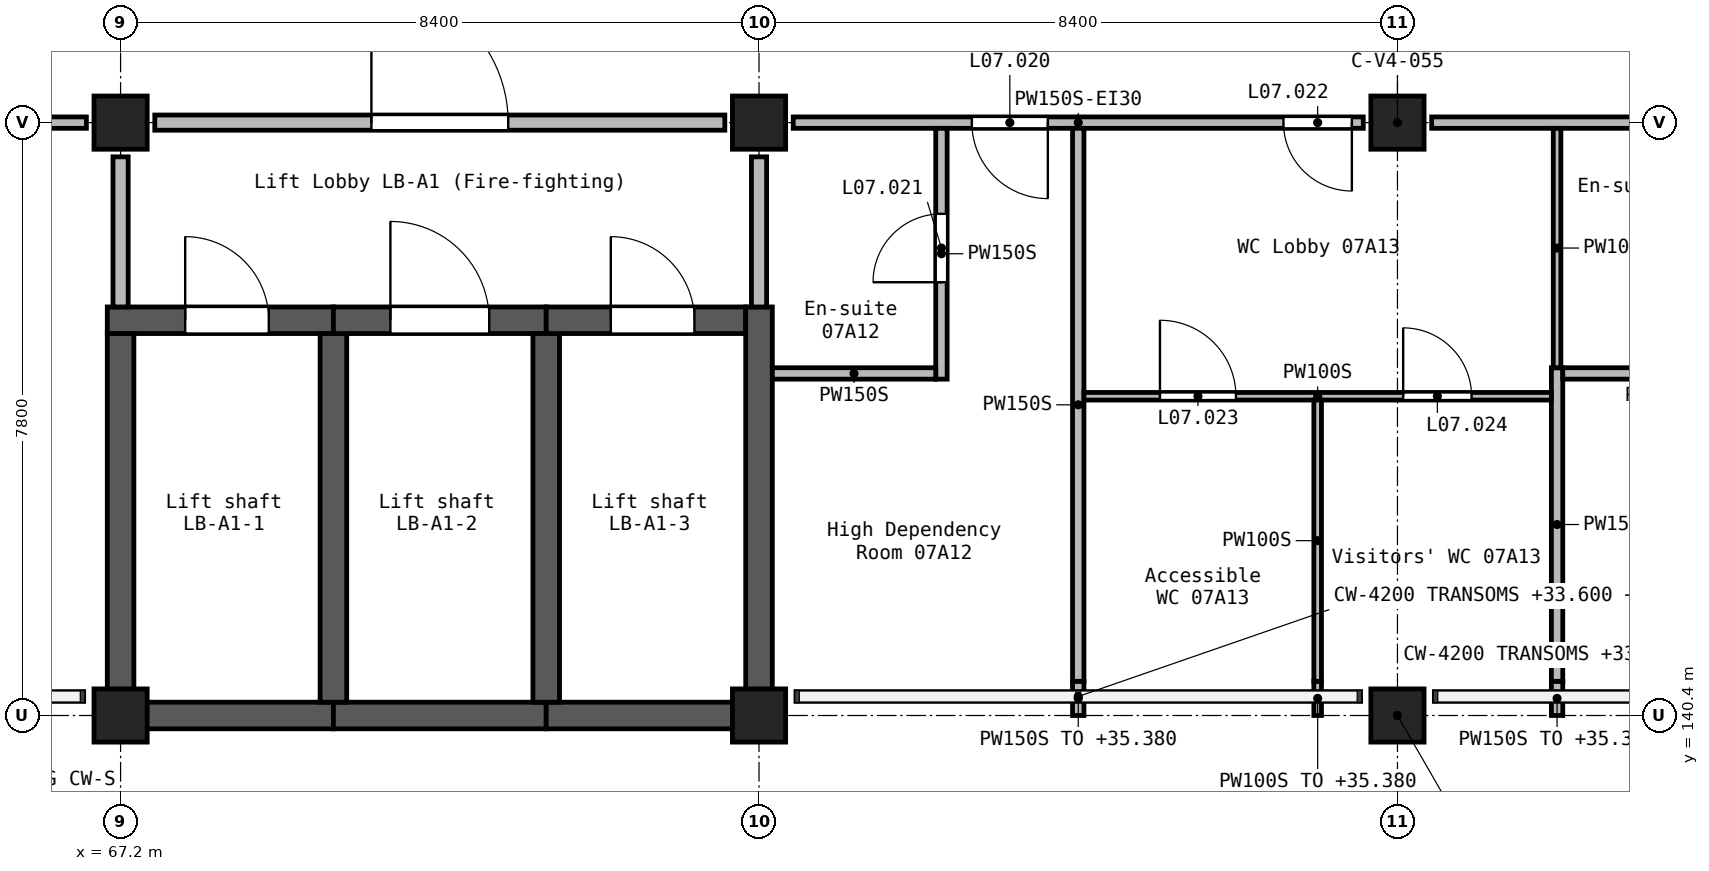
"""IFC4 building model, lengths in metres.
Left out: names, types, materials, properties, quantities, classifications, styles, units other than length and angle.
Written with IfcOpenShell. Run it as: python <this file> out.ifc"""

import sys

from ifc_helpers import new_model, si_unit, direction, frame, frame_2d, origin, origin_2d, place, context, subcontext, project, spatial, rectangle, extrude, element, fill, save


model = new_model("IFC4")
c1 = context("Model", 3, precision=1e-05, world=origin(), true_north=direction((0.0, 1.0)))
c2 = subcontext(c1, "Body", "Model", "MODEL_VIEW")
j1 = project(units=[si_unit("LENGTHUNIT", "METRE"), si_unit("PLANEANGLEUNIT", "RADIAN")], contexts=[c1])
p1 = place(None, origin())
s1 = spatial("IfcSite", under=j1, at=p1, CompositionType="ELEMENT")
p2 = place(p1, origin())
s2 = spatial("IfcBuilding", under=s1, at=p2, CompositionType="ELEMENT")
p3 = place(p2, frame((0.0, 0.0, 32.7)))
s3 = spatial("IfcBuildingStorey", under=s2, at=p3, CompositionType="ELEMENT", Elevation=32.7)
for number, where, z_axis, x_axis in (
    (1, (67.2, 140.4, 0.0), (0.0, 0.0, 1.0), (1.0, 0.0, 0.0)),
    (2, (67.2, 148.2, 0.0), (0.0, 0.0, 1.0), (1.0, 0.0, 0.0)),
    (3, (75.6, 140.4, 0.0), (0.0, 0.0, 1.0), (1.0, 0.0, 0.0)),
    (4, (75.6, 148.2, 0.0), (0.0, 0.0, 1.0), (1.0, 0.0, 0.0)),
    (5, (84.0, 140.4, 0.0), (0.0, 0.0, 1.0), (1.0, 0.0, 0.0)),
    (6, (84.0, 148.2, 0.0), (0.0, 0.0, 1.0), (1.0, 0.0, 0.0)),
):
    element("IfcColumn", number, at=place(p3, frame(where, z_axis=z_axis, x_axis=x_axis)), inside=s3, PredefinedType="COLUMN", context=c2, shape_type="SweptSolid", body=[
        extrude(rectangle(XDim=0.7, YDim=0.7, at=origin_2d()), origin(), (0.0, 0.0, 1.0), 3.9),
    ])
p4 = place(p3, frame((67.025, 145.6, 0.0), z_axis=(0.0, 0.0, 1.0), x_axis=(1.0, 0.0, 0.0)))
e7 = element("IfcWall", 7, at=p4, inside=s3, PredefinedType="SHEAR", context=c2, shape_type="SweptSolid", body=[
    extrude(rectangle(XDim=2.975, YDim=0.35, at=frame_2d((1.488, 0.0))), origin(), (0.0, 0.0, 1.0), 3.9),
])
p5 = place(p4, frame((1.025, 0.0, 0.0)))
e8 = element("IfcOpeningElement", 8, at=p5, cuts=e7, PredefinedType="OPENING", context=c2, shape_type="SweptSolid", body=[
    extrude(rectangle(XDim=1.1, YDim=2.1, at=frame_2d((0.55, 1.05))), frame((0.0, 0.185, 0.0), z_axis=(0.0, -1.0, 0.0), x_axis=(1.0, 0.0, 0.0)), (0.0, 0.0, 1.0), 0.37),
])
p6 = place(p3, frame((67.2, 140.225, 0.0), z_axis=(0.0, 0.0, 1.0), x_axis=(0.0, 1.0, 0.0)))
e9 = element("IfcWall", 9, at=p6, inside=s3, PredefinedType="SHEAR", context=c2, shape_type="SweptSolid", body=[
    extrude(rectangle(XDim=5.2, YDim=0.35, at=frame_2d((2.6, 0.0))), origin(), (0.0, 0.0, 1.0), 3.9),
])
p7 = place(p3, frame((67.375, 140.4, 0.0), z_axis=(0.0, 0.0, 1.0), x_axis=(1.0, 0.0, 0.0)))
e10 = element("IfcWall", 10, at=p7, inside=s3, PredefinedType="SHEAR", context=c2, shape_type="SweptSolid", body=[
    extrude(rectangle(XDim=2.625, YDim=0.35, at=frame_2d((1.312, 0.0))), origin(), (0.0, 0.0, 1.0), 3.9),
])
p8 = place(p3, frame((70.0, 140.4, 0.0), z_axis=(0.0, 0.0, 1.0), x_axis=(1.0, 0.0, 0.0)))
e11 = element("IfcWall", 11, at=p8, inside=s3, PredefinedType="SHEAR", context=c2, shape_type="SweptSolid", body=[
    extrude(rectangle(XDim=2.8, YDim=0.35, at=frame_2d((1.4, 0.0))), origin(), (0.0, 0.0, 1.0), 3.9),
])
p9 = place(p3, frame((70.0, 140.575, 0.0), z_axis=(0.0, 0.0, 1.0), x_axis=(0.0, 1.0, 0.0)))
e12 = element("IfcWall", 12, at=p9, inside=s3, PredefinedType="SHEAR", context=c2, shape_type="SweptSolid", body=[
    extrude(rectangle(XDim=4.85, YDim=0.35, at=frame_2d((2.425, 0.0))), origin(), (0.0, 0.0, 1.0), 3.9),
])
p10 = place(p3, frame((70.0, 145.6, 0.0), z_axis=(0.0, 0.0, 1.0), x_axis=(1.0, 0.0, 0.0)))
e13 = element("IfcWall", 13, at=p10, inside=s3, PredefinedType="SHEAR", context=c2, shape_type="SweptSolid", body=[
    extrude(rectangle(XDim=2.8, YDim=0.35, at=frame_2d((1.4, 0.0))), origin(), (0.0, 0.0, 1.0), 3.9),
])
p11 = place(p10, frame((0.75, 0.0, 0.0)))
e14 = element("IfcOpeningElement", 14, at=p11, cuts=e13, PredefinedType="OPENING", context=c2, shape_type="SweptSolid", body=[
    extrude(rectangle(XDim=1.3, YDim=2.1, at=frame_2d((0.65, 1.05))), frame((0.0, 0.185, 0.0), z_axis=(0.0, -1.0, 0.0), x_axis=(1.0, 0.0, 0.0)), (0.0, 0.0, 1.0), 0.37),
])
p12 = place(p3, frame((72.8, 140.4, 0.0), z_axis=(0.0, 0.0, 1.0), x_axis=(1.0, 0.0, 0.0)))
e15 = element("IfcWall", 15, at=p12, inside=s3, PredefinedType="SHEAR", context=c2, shape_type="SweptSolid", body=[
    extrude(rectangle(XDim=2.625, YDim=0.35, at=frame_2d((1.312, 0.0))), origin(), (0.0, 0.0, 1.0), 3.9),
])
p13 = place(p3, frame((72.8, 140.575, 0.0), z_axis=(0.0, 0.0, 1.0), x_axis=(0.0, 1.0, 0.0)))
e16 = element("IfcWall", 16, at=p13, inside=s3, PredefinedType="SHEAR", context=c2, shape_type="SweptSolid", body=[
    extrude(rectangle(XDim=4.85, YDim=0.35, at=frame_2d((2.425, 0.0))), origin(), (0.0, 0.0, 1.0), 3.9),
])
p14 = place(p3, frame((72.8, 145.6, 0.0), z_axis=(0.0, 0.0, 1.0), x_axis=(1.0, 0.0, 0.0)))
e17 = element("IfcWall", 17, at=p14, inside=s3, PredefinedType="SHEAR", context=c2, shape_type="SweptSolid", body=[
    extrude(rectangle(XDim=2.625, YDim=0.35, at=frame_2d((1.312, 0.0))), origin(), (0.0, 0.0, 1.0), 3.9),
])
p15 = place(p14, frame((0.85, 0.0, 0.0)))
e18 = element("IfcOpeningElement", 18, at=p15, cuts=e17, PredefinedType="OPENING", context=c2, shape_type="SweptSolid", body=[
    extrude(rectangle(XDim=1.1, YDim=2.1, at=frame_2d((0.55, 1.05))), frame((0.0, 0.185, 0.0), z_axis=(0.0, -1.0, 0.0), x_axis=(1.0, 0.0, 0.0)), (0.0, 0.0, 1.0), 0.37),
])
p16 = place(p3, frame((75.6, 140.225, 0.0), z_axis=(0.0, 0.0, 1.0), x_axis=(0.0, 1.0, 0.0)))
e19 = element("IfcWall", 19, at=p16, inside=s3, PredefinedType="SHEAR", context=c2, shape_type="SweptSolid", body=[
    extrude(rectangle(XDim=5.55, YDim=0.35, at=frame_2d((2.775, 0.0))), origin(), (0.0, 0.0, 1.0), 3.9),
])
p17 = place(p3, frame((67.65, 148.2, 0.0), z_axis=(0.0, 0.0, 1.0), x_axis=(1.0, 0.0, 0.0)))
e20 = element("IfcWall", 20, at=p17, inside=s3, PredefinedType="SOLIDWALL", context=c2, shape_type="SweptSolid", body=[
    extrude(rectangle(XDim=7.5, YDim=0.2, at=frame_2d((3.75, 0.0))), origin(), (0.0, 0.0, 1.0), 3.6),
])
p18 = place(p17, frame((2.85, 0.0, 0.0)))
e21 = element("IfcOpeningElement", 21, at=p18, cuts=e20, PredefinedType="OPENING", context=c2, shape_type="SweptSolid", body=[
    extrude(rectangle(XDim=1.8, YDim=2.1, at=frame_2d((0.9, 1.05))), frame((0.0, 0.11, 0.0), z_axis=(0.0, -1.0, 0.0), x_axis=(1.0, 0.0, 0.0)), (0.0, 0.0, 1.0), 0.22),
])
for number, where, z_axis, x_axis in (
    (22, (67.2, 145.775, 0.0), (0.0, 0.0, 1.0), (0.0, 1.0, 0.0)),
    (23, (75.6, 145.775, 0.0), (0.0, 0.0, 1.0), (0.0, 1.0, 0.0)),
):
    element("IfcWall", number, at=place(p3, frame(where, z_axis=z_axis, x_axis=x_axis)), inside=s3, PredefinedType="SOLIDWALL", context=c2, shape_type="SweptSolid", body=[
        extrude(rectangle(XDim=1.975, YDim=0.2, at=frame_2d((0.988, 0.0))), origin(), (0.0, 0.0, 1.0), 3.6),
    ])
p19 = place(p3, frame((91.95, 148.2, 0.0), z_axis=(0.0, 0.0, 1.0), x_axis=(-1.0, 0.0, 0.0)))
e24 = element("IfcWall", 24, at=p19, inside=s3, PredefinedType="PARTITIONING", context=c2, shape_type="SweptSolid", body=[
    extrude(rectangle(XDim=7.5, YDim=0.15, at=frame_2d((3.75, 0.0))), origin(), (0.0, 0.0, 1.0), 3.6),
])
p20 = place(p19, frame((0.1, 0.0, 0.0)))
e25 = element("IfcOpeningElement", 25, at=p20, cuts=e24, PredefinedType="OPENING", context=c2, shape_type="SweptSolid", body=[
    extrude(rectangle(XDim=1.0, YDim=2.1, at=frame_2d((0.5, 1.05))), frame((0.0, 0.085, 0.0), z_axis=(0.0, -1.0, 0.0), x_axis=(1.0, 0.0, 0.0)), (0.0, 0.0, 1.0), 0.17),
])
p21 = place(p3, frame((83.55, 148.2, 0.0), z_axis=(0.0, 0.0, 1.0), x_axis=(-1.0, 0.0, 0.0)))
e26 = element("IfcWall", 26, at=p21, inside=s3, PredefinedType="PARTITIONING", context=c2, shape_type="SweptSolid", body=[
    extrude(rectangle(XDim=7.5, YDim=0.15, at=frame_2d((3.75, 0.0))), origin(), (0.0, 0.0, 1.0), 3.6),
])
p22 = place(p21, frame((4.15, 0.0, 0.0)))
e27 = element("IfcOpeningElement", 27, at=p22, cuts=e26, PredefinedType="OPENING", context=c2, shape_type="SweptSolid", body=[
    extrude(rectangle(XDim=1.0, YDim=2.1, at=frame_2d((0.5, 1.05))), frame((0.0, 0.085, 0.0), z_axis=(0.0, -1.0, 0.0), x_axis=(1.0, 0.0, 0.0)), (0.0, 0.0, 1.0), 0.17),
])
p23 = place(p21, frame((0.15, 0.0, 0.0)))
e28 = element("IfcOpeningElement", 28, at=p23, cuts=e26, PredefinedType="OPENING", context=c2, shape_type="SweptSolid", body=[
    extrude(rectangle(XDim=0.9, YDim=2.1, at=frame_2d((0.45, 1.05))), frame((0.0, 0.085, 0.0), z_axis=(0.0, -1.0, 0.0), x_axis=(1.0, 0.0, 0.0)), (0.0, 0.0, 1.0), 0.17),
])
p24 = place(p3, frame((66.75, 148.2, 0.0), z_axis=(0.0, 0.0, 1.0), x_axis=(-1.0, 0.0, 0.0)))
e29 = element("IfcWall", 29, at=p24, inside=s3, PredefinedType="PARTITIONING", context=c2, shape_type="SweptSolid", body=[
    extrude(rectangle(XDim=7.5, YDim=0.15, at=frame_2d((3.75, 0.0))), origin(), (0.0, 0.0, 1.0), 3.6),
])
p25 = place(p24, frame((1.9, 0.0, 0.0)))
e30 = element("IfcOpeningElement", 30, at=p25, cuts=e29, PredefinedType="OPENING", context=c2, shape_type="SweptSolid", body=[
    extrude(rectangle(XDim=1.0, YDim=2.1, at=frame_2d((0.5, 1.05))), frame((0.0, 0.085, 0.0), z_axis=(0.0, -1.0, 0.0), x_axis=(1.0, 0.0, 0.0)), (0.0, 0.0, 1.0), 0.17),
])
p26 = place(p3, frame((79.8, 140.4, 0.0), z_axis=(0.0, 0.0, 1.0), x_axis=(0.0, 1.0, 0.0)))
e31 = element("IfcWall", 31, at=p26, inside=s3, PredefinedType="PARTITIONING", context=c2, shape_type="SweptSolid", body=[
    extrude(rectangle(XDim=0.45, YDim=0.15, at=frame_2d((0.225, 0.0))), origin(), (0.0, 0.0, 1.0), 2.68),
])
p27 = place(p3, frame((79.8, 140.85, 0.0), z_axis=(0.0, 0.0, 1.0), x_axis=(0.0, 1.0, 0.0)))
e32 = element("IfcWall", 32, at=p27, inside=s3, PredefinedType="PARTITIONING", context=c2, shape_type="SweptSolid", body=[
    extrude(rectangle(XDim=7.275, YDim=0.15, at=frame_2d((3.637, 0.0))), origin(), (0.0, 0.0, 1.0), 3.6),
])
p28 = place(p3, frame((86.1, 140.4, 0.0), z_axis=(0.0, 0.0, 1.0), x_axis=(0.0, 1.0, 0.0)))
e33 = element("IfcWall", 33, at=p28, inside=s3, PredefinedType="PARTITIONING", context=c2, shape_type="SweptSolid", body=[
    extrude(rectangle(XDim=0.45, YDim=0.15, at=frame_2d((0.225, 0.0))), origin(), (0.0, 0.0, 1.0), 2.68),
])
p29 = place(p3, frame((86.1, 140.85, 0.0), z_axis=(0.0, 0.0, 1.0), x_axis=(0.0, 1.0, 0.0)))
e34 = element("IfcWall", 34, at=p29, inside=s3, PredefinedType="PARTITIONING", context=c2, shape_type="SweptSolid", body=[
    extrude(rectangle(XDim=4.125, YDim=0.15, at=frame_2d((2.062, 0.0))), origin(), (0.0, 0.0, 1.0), 3.6),
])
p30 = place(p3, frame((78.0, 144.825, 0.0), z_axis=(0.0, 0.0, 1.0), x_axis=(0.0, 1.0, 0.0)))
e35 = element("IfcWall", 35, at=p30, inside=s3, PredefinedType="PARTITIONING", context=c2, shape_type="SweptSolid", body=[
    extrude(rectangle(XDim=3.3, YDim=0.15, at=frame_2d((1.65, 0.0))), origin(), (0.0, 0.0, 1.0), 3.6),
])
p31 = place(p30, frame((1.275, 0.0, 0.0)))
e36 = element("IfcOpeningElement", 36, at=p31, cuts=e35, PredefinedType="OPENING", context=c2, shape_type="SweptSolid", body=[
    extrude(rectangle(XDim=0.9, YDim=2.1, at=frame_2d((0.45, 1.05))), frame((0.0, 0.085, 0.0), z_axis=(0.0, -1.0, 0.0), x_axis=(1.0, 0.0, 0.0)), (0.0, 0.0, 1.0), 0.17),
])
p32 = place(p3, frame((86.175, 144.9, 0.0), z_axis=(0.0, 0.0, 1.0), x_axis=(1.0, 0.0, 0.0)))
e37 = element("IfcWall", 37, at=p32, inside=s3, PredefinedType="PARTITIONING", context=c2, shape_type="SweptSolid", body=[
    extrude(rectangle(XDim=2.55, YDim=0.15, at=frame_2d((1.275, 0.0))), origin(), (0.0, 0.0, 1.0), 3.6),
])
p33 = place(p3, frame((75.775, 144.9, 0.0), z_axis=(0.0, 0.0, 1.0), x_axis=(1.0, 0.0, 0.0)))
e38 = element("IfcWall", 38, at=p33, inside=s3, PredefinedType="PARTITIONING", context=c2, shape_type="SweptSolid", body=[
    extrude(rectangle(XDim=2.15, YDim=0.15, at=frame_2d((1.075, 0.0))), origin(), (0.0, 0.0, 1.0), 3.6),
])
p34 = place(p3, frame((79.875, 144.6, 0.0), z_axis=(0.0, 0.0, 1.0), x_axis=(1.0, 0.0, 0.0)))
e39 = element("IfcWall", 39, at=p34, inside=s3, PredefinedType="PARTITIONING", context=c2, shape_type="SweptSolid", body=[
    extrude(rectangle(XDim=6.15, YDim=0.1, at=frame_2d((3.075, 0.0))), origin(), (0.0, 0.0, 1.0), 3.6),
])
p35 = place(p34, frame((1.0, 0.0, 0.0)))
e40 = element("IfcOpeningElement", 40, at=p35, cuts=e39, PredefinedType="OPENING", context=c2, shape_type="SweptSolid", body=[
    extrude(rectangle(XDim=1.0, YDim=2.1, at=frame_2d((0.5, 1.05))), frame((0.0, 0.06, 0.0), z_axis=(0.0, -1.0, 0.0), x_axis=(1.0, 0.0, 0.0)), (0.0, 0.0, 1.0), 0.12),
])
p36 = place(p34, frame((4.2, 0.0, 0.0)))
e41 = element("IfcOpeningElement", 41, at=p36, cuts=e39, PredefinedType="OPENING", context=c2, shape_type="SweptSolid", body=[
    extrude(rectangle(XDim=0.9, YDim=2.1, at=frame_2d((0.45, 1.05))), frame((0.0, 0.06, 0.0), z_axis=(0.0, -1.0, 0.0), x_axis=(1.0, 0.0, 0.0)), (0.0, 0.0, 1.0), 0.12),
])
p37 = place(p3, frame((82.95, 140.4, 0.0), z_axis=(0.0, 0.0, 1.0), x_axis=(0.0, 1.0, 0.0)))
e42 = element("IfcWall", 42, at=p37, inside=s3, PredefinedType="PARTITIONING", context=c2, shape_type="SweptSolid", body=[
    extrude(rectangle(XDim=0.45, YDim=0.1, at=frame_2d((0.225, 0.0))), origin(), (0.0, 0.0, 1.0), 2.68),
])
p38 = place(p3, frame((82.95, 140.85, 0.0), z_axis=(0.0, 0.0, 1.0), x_axis=(0.0, 1.0, 0.0)))
e43 = element("IfcWall", 43, at=p38, inside=s3, PredefinedType="PARTITIONING", context=c2, shape_type="SweptSolid", body=[
    extrude(rectangle(XDim=3.7, YDim=0.1, at=frame_2d((1.85, 0.0))), origin(), (0.0, 0.0, 1.0), 3.6),
])
p39 = place(p3, frame((86.1, 144.975, 0.0), z_axis=(0.0, 0.0, 1.0), x_axis=(0.0, 1.0, 0.0)))
e44 = element("IfcWall", 44, at=p39, inside=s3, PredefinedType="PARTITIONING", context=c2, shape_type="SweptSolid", body=[
    extrude(rectangle(XDim=3.15, YDim=0.1, at=frame_2d((1.575, 0.0))), origin(), (0.0, 0.0, 1.0), 3.6),
])
p40 = place(p22, origin())
e45 = element("IfcDoor", 45, at=p40, inside=s3, OperationType="SINGLE_SWING_RIGHT", PredefinedType="DOOR", context=c2, shape_type="SweptSolid", body=[
    extrude(rectangle(XDim=1.0, YDim=2.1, at=frame_2d((0.5, 1.05))), frame((0.0, 0.025, 0.0), z_axis=(0.0, -1.0, 0.0), x_axis=(1.0, 0.0, 0.0)), (0.0, 0.0, 1.0), 0.05),
])
fill(e27, e45)
p41 = place(p31, origin())
e46 = element("IfcDoor", 46, at=p41, inside=s3, OperationType="SINGLE_SWING_RIGHT", PredefinedType="DOOR", context=c2, shape_type="SweptSolid", body=[
    extrude(rectangle(XDim=0.9, YDim=2.1, at=frame_2d((0.45, 1.05))), frame((0.0, 0.025, 0.0), z_axis=(0.0, -1.0, 0.0), x_axis=(1.0, 0.0, 0.0)), (0.0, 0.0, 1.0), 0.05),
])
fill(e36, e46)
p42 = place(p23, origin())
e47 = element("IfcDoor", 47, at=p42, inside=s3, OperationType="SINGLE_SWING_LEFT", PredefinedType="DOOR", context=c2, shape_type="SweptSolid", body=[
    extrude(rectangle(XDim=0.9, YDim=2.1, at=frame_2d((0.45, 1.05))), frame((0.0, 0.025, 0.0), z_axis=(0.0, -1.0, 0.0), x_axis=(1.0, 0.0, 0.0)), (0.0, 0.0, 1.0), 0.05),
])
fill(e28, e47)
p43 = place(p35, frame((1.0, 0.0, 0.0), z_axis=(0.0, 0.0, 1.0), x_axis=(-1.0, 0.0, 0.0)))
e48 = element("IfcDoor", 48, at=p43, inside=s3, OperationType="SINGLE_SWING_RIGHT", PredefinedType="DOOR", context=c2, shape_type="SweptSolid", body=[
    extrude(rectangle(XDim=1.0, YDim=2.1, at=frame_2d((0.5, 1.05))), frame((0.0, 0.025, 0.0), z_axis=(0.0, -1.0, 0.0), x_axis=(1.0, 0.0, 0.0)), (0.0, 0.0, 1.0), 0.05),
])
fill(e40, e48)
p44 = place(p36, frame((0.9, 0.0, 0.0), z_axis=(0.0, 0.0, 1.0), x_axis=(-1.0, 0.0, 0.0)))
e49 = element("IfcDoor", 49, at=p44, inside=s3, OperationType="SINGLE_SWING_LEFT", PredefinedType="DOOR", context=c2, shape_type="SweptSolid", body=[
    extrude(rectangle(XDim=0.9, YDim=2.1, at=frame_2d((0.45, 1.05))), frame((0.0, 0.025, 0.0), z_axis=(0.0, -1.0, 0.0), x_axis=(1.0, 0.0, 0.0)), (0.0, 0.0, 1.0), 0.05),
])
fill(e41, e49)
p45 = place(p18, frame((1.8, 0.0, 0.0), z_axis=(0.0, 0.0, 1.0), x_axis=(-1.0, 0.0, 0.0)))
e50 = element("IfcDoor", 50, at=p45, inside=s3, OperationType="DOUBLE_DOOR_SINGLE_SWING", PredefinedType="DOOR", context=c2, shape_type="SweptSolid", body=[
    extrude(rectangle(XDim=1.8, YDim=2.1, at=frame_2d((0.9, 1.05))), frame((0.0, 0.025, 0.0), z_axis=(0.0, -1.0, 0.0), x_axis=(1.0, 0.0, 0.0)), (0.0, 0.0, 1.0), 0.05),
])
fill(e21, e50)
p46 = place(p5, origin())
e51 = element("IfcDoor", 51, at=p46, inside=s3, OperationType="DOUBLE_DOOR_SLIDING", PredefinedType="DOOR", context=c2, shape_type="SweptSolid", body=[
    extrude(rectangle(XDim=1.1, YDim=2.1, at=frame_2d((0.55, 1.05))), frame((0.0, 0.025, 0.0), z_axis=(0.0, -1.0, 0.0), x_axis=(1.0, 0.0, 0.0)), (0.0, 0.0, 1.0), 0.05),
])
fill(e8, e51)
p47 = place(p11, origin())
e52 = element("IfcDoor", 52, at=p47, inside=s3, OperationType="DOUBLE_DOOR_SLIDING", PredefinedType="DOOR", context=c2, shape_type="SweptSolid", body=[
    extrude(rectangle(XDim=1.3, YDim=2.1, at=frame_2d((0.65, 1.05))), frame((0.0, 0.025, 0.0), z_axis=(0.0, -1.0, 0.0), x_axis=(1.0, 0.0, 0.0)), (0.0, 0.0, 1.0), 0.05),
])
fill(e14, e52)
p48 = place(p15, origin())
e53 = element("IfcDoor", 53, at=p48, inside=s3, OperationType="DOUBLE_DOOR_SLIDING", PredefinedType="DOOR", context=c2, shape_type="SweptSolid", body=[
    extrude(rectangle(XDim=1.1, YDim=2.1, at=frame_2d((0.55, 1.05))), frame((0.0, 0.025, 0.0), z_axis=(0.0, -1.0, 0.0), x_axis=(1.0, 0.0, 0.0)), (0.0, 0.0, 1.0), 0.05),
])
fill(e18, e53)
save(model, sys.argv[1])
